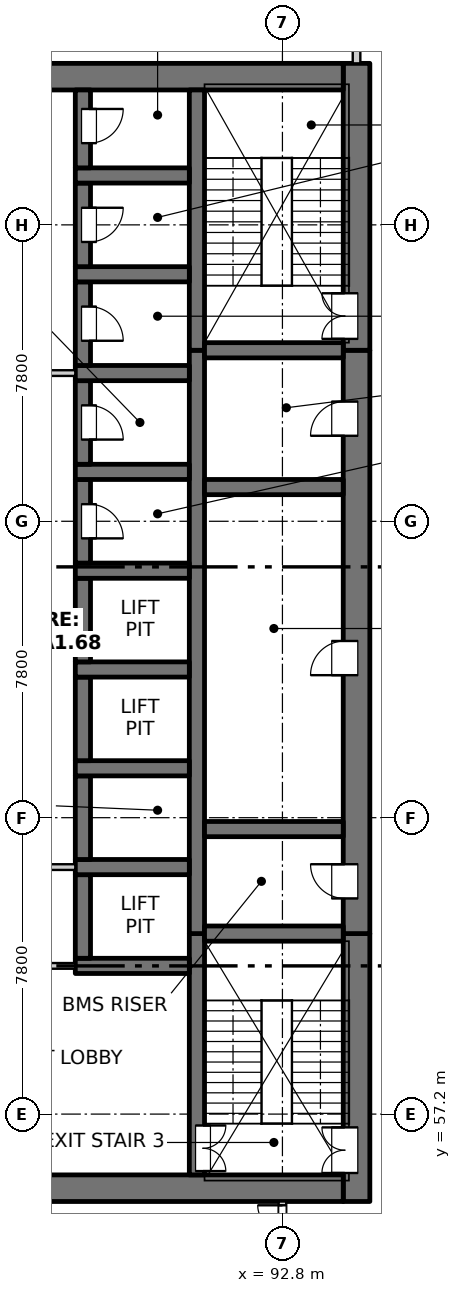
"""IFC4 building model, lengths in metres.
Left out: names, types, materials, properties, quantities, classifications, styles, units other than length and angle.
Written with IfcOpenShell. Run it as: python <this file> out.ifc"""

import sys

from ifc_helpers import new_model, si_unit, direction, frame, frame_2d, origin, place, context, subcontext, project, spatial, rectangle, extrude, element, fill, save


model = new_model("IFC4")
c1 = context("Model", 3, precision=1e-05, world=origin(), true_north=direction((0.0, 1.0)))
c2 = subcontext(c1, "Body", "Model", "MODEL_VIEW")
j1 = project(units=[si_unit("LENGTHUNIT", "METRE"), si_unit("PLANEANGLEUNIT", "RADIAN")], contexts=[c1])
p1 = place(None, origin())
s1 = spatial("IfcSite", under=j1, at=p1, CompositionType="ELEMENT")
p2 = place(p1, origin())
s2 = spatial("IfcBuilding", under=s1, at=p2, CompositionType="ELEMENT")
p3 = place(p2, frame((0.0, 0.0, -4.5)))
s3 = spatial("IfcBuildingStorey", under=s2, at=p3, CompositionType="ELEMENT", Elevation=-4.5)
p4 = place(p3, frame((94.75, 54.9, -0.35), z_axis=(0.0, 0.0, 1.0), x_axis=(0.0, 1.0, 0.0)))
e1 = element("IfcWall", 1, at=p4, inside=s3, PredefinedType="SOLIDWALL", context=c2, shape_type="SweptSolid", body=[
    extrude(rectangle(XDim=7.05, YDim=0.7, at=frame_2d((3.525, 0.0))), origin(), (0.0, 0.0, 1.0), 4.45),
])
p5 = place(p4, frame((0.75, 0.0, 0.35)))
e2 = element("IfcOpeningElement", 2, at=p5, cuts=e1, PredefinedType="OPENING", context=c2, shape_type="SweptSolid", body=[
    extrude(rectangle(XDim=1.2, YDim=2.1, at=frame_2d((0.6, 1.05))), frame((0.0, 0.36, 0.0), z_axis=(0.0, -1.0, 0.0), x_axis=(1.0, 0.0, 0.0)), (0.0, 0.0, 1.0), 0.72),
])
p6 = place(p3, frame((94.75, 61.95, -0.35), z_axis=(0.0, 0.0, 1.0), x_axis=(0.0, 1.0, 0.0)))
e3 = element("IfcWall", 3, at=p6, inside=s3, PredefinedType="SOLIDWALL", context=c2, shape_type="SweptSolid", body=[
    extrude(rectangle(XDim=15.35, YDim=0.7, at=frame_2d((7.675, 0.0))), origin(), (0.0, 0.0, 1.0), 4.45),
])
p7 = place(p6, frame((0.925, 0.0, 0.35)))
e4 = element("IfcOpeningElement", 4, at=p7, cuts=e3, PredefinedType="OPENING", context=c2, shape_type="SweptSolid", body=[
    extrude(rectangle(XDim=0.9, YDim=2.1, at=frame_2d((0.45, 1.05))), frame((0.0, 0.36, 0.0), z_axis=(0.0, -1.0, 0.0), x_axis=(1.0, 0.0, 0.0)), (0.0, 0.0, 1.0), 0.72),
])
p8 = place(p6, frame((6.8, 0.0, 0.35)))
e5 = element("IfcOpeningElement", 5, at=p8, cuts=e3, PredefinedType="OPENING", context=c2, shape_type="SweptSolid", body=[
    extrude(rectangle(XDim=0.9, YDim=2.1, at=frame_2d((0.45, 1.05))), frame((0.0, 0.36, 0.0), z_axis=(0.0, -1.0, 0.0), x_axis=(1.0, 0.0, 0.0)), (0.0, 0.0, 1.0), 0.72),
])
p9 = place(p6, frame((13.1, 0.0, 0.35)))
e6 = element("IfcOpeningElement", 6, at=p9, cuts=e3, PredefinedType="OPENING", context=c2, shape_type="SweptSolid", body=[
    extrude(rectangle(XDim=0.9, YDim=2.1, at=frame_2d((0.45, 1.05))), frame((0.0, 0.36, 0.0), z_axis=(0.0, -1.0, 0.0), x_axis=(1.0, 0.0, 0.0)), (0.0, 0.0, 1.0), 0.72),
])
p10 = place(p3, frame((94.75, 77.3, -0.35), z_axis=(0.0, 0.0, 1.0), x_axis=(0.0, 1.0, 0.0)))
e7 = element("IfcWall", 7, at=p10, inside=s3, PredefinedType="SOLIDWALL", context=c2, shape_type="SweptSolid", body=[
    extrude(rectangle(XDim=7.55, YDim=0.7, at=frame_2d((3.775, 0.0))), origin(), (0.0, 0.0, 1.0), 4.45),
])
p11 = place(p10, frame((0.3, 0.0, 0.35)))
e8 = element("IfcOpeningElement", 8, at=p11, cuts=e7, PredefinedType="OPENING", context=c2, shape_type="SweptSolid", body=[
    extrude(rectangle(XDim=1.2, YDim=2.1, at=frame_2d((0.6, 1.05))), frame((0.0, 0.36, 0.0), z_axis=(0.0, -1.0, 0.0), x_axis=(1.0, 0.0, 0.0)), (0.0, 0.0, 1.0), 0.72),
])
p12 = place(p3, frame((75.6, 55.25, -0.35), z_axis=(0.0, 0.0, 1.0), x_axis=(1.0, 0.0, 0.0)))
e9 = element("IfcWall", 9, at=p12, inside=s3, PredefinedType="SOLIDWALL", context=c2, shape_type="SweptSolid", body=[
    extrude(rectangle(XDim=18.8, YDim=0.7, at=frame_2d((9.4, 0.0))), origin(), (0.0, 0.0, 1.0), 4.45),
])
p13 = place(p12, frame((8.65, 0.0, 0.35)))
e10 = element("IfcOpeningElement", 10, at=p13, cuts=e9, PredefinedType="OPENING", context=c2, shape_type="SweptSolid", body=[
    extrude(rectangle(XDim=1.5, YDim=2.1, at=frame_2d((0.75, 1.05))), frame((0.0, 0.36, 0.0), z_axis=(0.0, -1.0, 0.0), x_axis=(1.0, 0.0, 0.0)), (0.0, 0.0, 1.0), 0.72),
])
p14 = place(p3, frame((75.6, 84.5, -0.35), z_axis=(0.0, 0.0, 1.0), x_axis=(1.0, 0.0, 0.0)))
e11 = element("IfcWall", 11, at=p14, inside=s3, PredefinedType="SOLIDWALL", context=c2, shape_type="SweptSolid", body=[
    extrude(rectangle(XDim=18.8, YDim=0.7, at=frame_2d((9.4, 0.0))), origin(), (0.0, 0.0, 1.0), 4.45),
])
p15 = place(p3, frame((90.55, 55.6, -0.35), z_axis=(0.0, 0.0, 1.0), x_axis=(0.0, 1.0, 0.0)))
e12 = element("IfcWall", 12, at=p15, inside=s3, PredefinedType="SOLIDWALL", context=c2, shape_type="SweptSolid", body=[
    extrude(rectangle(XDim=6.35, YDim=0.4, at=frame_2d((3.175, 0.0))), origin(), (0.0, 0.0, 1.0), 4.45),
])
p16 = place(p15, frame((0.1, 0.0, 0.35)))
e13 = element("IfcOpeningElement", 13, at=p16, cuts=e12, PredefinedType="OPENING", context=c2, shape_type="SweptSolid", body=[
    extrude(rectangle(XDim=1.2, YDim=2.1, at=frame_2d((0.6, 1.05))), frame((0.0, 0.21, 0.0), z_axis=(0.0, -1.0, 0.0), x_axis=(1.0, 0.0, 0.0)), (0.0, 0.0, 1.0), 0.42),
])
p17 = place(p3, frame((90.55, 61.95, -0.35), z_axis=(0.0, 0.0, 1.0), x_axis=(0.0, 1.0, 0.0)))
e14 = element("IfcWall", 14, at=p17, inside=s3, PredefinedType="SOLIDWALL", context=c2, shape_type="SweptSolid", body=[
    extrude(rectangle(XDim=15.35, YDim=0.4, at=frame_2d((7.675, 0.0))), origin(), (0.0, 0.0, 1.0), 4.45),
])
p18 = place(p3, frame((90.55, 77.3, -0.35), z_axis=(0.0, 0.0, 1.0), x_axis=(0.0, 1.0, 0.0)))
e15 = element("IfcWall", 15, at=p18, inside=s3, PredefinedType="SOLIDWALL", context=c2, shape_type="SweptSolid", body=[
    extrude(rectangle(XDim=6.85, YDim=0.4, at=frame_2d((3.425, 0.0))), origin(), (0.0, 0.0, 1.0), 4.45),
])
p19 = place(p3, frame((87.35, 61.1, -0.35), z_axis=(0.0, 0.0, 1.0), x_axis=(1.0, 0.0, 0.0)))
e16 = element("IfcWall", 16, at=p19, inside=s3, PredefinedType="SOLIDWALL", context=c2, shape_type="SweptSolid", body=[
    extrude(rectangle(XDim=3.0, YDim=0.4, at=frame_2d((1.5, 0.0))), origin(), (0.0, 0.0, 1.0), 4.45),
])
p20 = place(p3, frame((87.55, 61.3, -0.35), z_axis=(0.0, 0.0, 1.0), x_axis=(0.0, 1.0, 0.0)))
e17 = element("IfcWall", 17, at=p20, inside=s3, PredefinedType="SOLIDWALL", context=c2, shape_type="SweptSolid", body=[
    extrude(rectangle(XDim=2.2, YDim=0.4, at=frame_2d((1.1, 0.0))), origin(), (0.0, 0.0, 1.0), 4.45),
])
p21 = place(p3, frame((87.35, 63.7, -0.35), z_axis=(0.0, 0.0, 1.0), x_axis=(1.0, 0.0, 0.0)))
e18 = element("IfcWall", 18, at=p21, inside=s3, PredefinedType="SOLIDWALL", context=c2, shape_type="SweptSolid", body=[
    extrude(rectangle(XDim=3.0, YDim=0.4, at=frame_2d((1.5, 0.0))), origin(), (0.0, 0.0, 1.0), 4.45),
])
p22 = place(p3, frame((87.55, 63.9, -0.35), z_axis=(0.0, 0.0, 1.0), x_axis=(0.0, 1.0, 0.0)))
e19 = element("IfcWall", 19, at=p22, inside=s3, PredefinedType="SOLIDWALL", context=c2, shape_type="SweptSolid", body=[
    extrude(rectangle(XDim=2.2, YDim=0.4, at=frame_2d((1.1, 0.0))), origin(), (0.0, 0.0, 1.0), 4.45),
])
p23 = place(p3, frame((87.35, 66.3, -0.35), z_axis=(0.0, 0.0, 1.0), x_axis=(1.0, 0.0, 0.0)))
e20 = element("IfcWall", 20, at=p23, inside=s3, PredefinedType="SOLIDWALL", context=c2, shape_type="SweptSolid", body=[
    extrude(rectangle(XDim=3.0, YDim=0.4, at=frame_2d((1.5, 0.0))), origin(), (0.0, 0.0, 1.0), 4.45),
])
p24 = place(p3, frame((87.55, 66.5, -0.35), z_axis=(0.0, 0.0, 1.0), x_axis=(0.0, 1.0, 0.0)))
e21 = element("IfcWall", 21, at=p24, inside=s3, PredefinedType="SOLIDWALL", context=c2, shape_type="SweptSolid", body=[
    extrude(rectangle(XDim=2.2, YDim=0.4, at=frame_2d((1.1, 0.0))), origin(), (0.0, 0.0, 1.0), 4.45),
])
p25 = place(p3, frame((87.35, 68.9, -0.35), z_axis=(0.0, 0.0, 1.0), x_axis=(1.0, 0.0, 0.0)))
e22 = element("IfcWall", 22, at=p25, inside=s3, PredefinedType="SOLIDWALL", context=c2, shape_type="SweptSolid", body=[
    extrude(rectangle(XDim=3.0, YDim=0.4, at=frame_2d((1.5, 0.0))), origin(), (0.0, 0.0, 1.0), 4.45),
])
p26 = place(p3, frame((87.55, 69.1, -0.35), z_axis=(0.0, 0.0, 1.0), x_axis=(0.0, 1.0, 0.0)))
e23 = element("IfcWall", 23, at=p26, inside=s3, PredefinedType="SOLIDWALL", context=c2, shape_type="SweptSolid", body=[
    extrude(rectangle(XDim=2.2, YDim=0.4, at=frame_2d((1.1, 0.0))), origin(), (0.0, 0.0, 1.0), 4.45),
])
p27 = place(p3, frame((87.35, 71.5, -0.35), z_axis=(0.0, 0.0, 1.0), x_axis=(1.0, 0.0, 0.0)))
e24 = element("IfcWall", 24, at=p27, inside=s3, PredefinedType="SOLIDWALL", context=c2, shape_type="SweptSolid", body=[
    extrude(rectangle(XDim=3.0, YDim=0.4, at=frame_2d((1.5, 0.0))), origin(), (0.0, 0.0, 1.0), 4.45),
])
p28 = place(p3, frame((87.55, 71.7, -0.35), z_axis=(0.0, 0.0, 1.0), x_axis=(0.0, 1.0, 0.0)))
e25 = element("IfcWall", 25, at=p28, inside=s3, PredefinedType="SOLIDWALL", context=c2, shape_type="SweptSolid", body=[
    extrude(rectangle(XDim=2.2, YDim=0.4, at=frame_2d((1.1, 0.0))), origin(), (0.0, 0.0, 1.0), 4.45),
])
p29 = place(p28, frame((0.65, 0.0, 0.35)))
e26 = element("IfcOpeningElement", 26, at=p29, cuts=e25, PredefinedType="OPENING", context=c2, shape_type="SweptSolid", body=[
    extrude(rectangle(XDim=0.9, YDim=2.1, at=frame_2d((0.45, 1.05))), frame((0.0, 0.21, 0.0), z_axis=(0.0, -1.0, 0.0), x_axis=(1.0, 0.0, 0.0)), (0.0, 0.0, 1.0), 0.42),
])
p30 = place(p3, frame((87.35, 74.1, -0.35), z_axis=(0.0, 0.0, 1.0), x_axis=(1.0, 0.0, 0.0)))
e27 = element("IfcWall", 27, at=p30, inside=s3, PredefinedType="SOLIDWALL", context=c2, shape_type="SweptSolid", body=[
    extrude(rectangle(XDim=3.0, YDim=0.4, at=frame_2d((1.5, 0.0))), origin(), (0.0, 0.0, 1.0), 4.45),
])
p31 = place(p3, frame((87.55, 74.3, -0.35), z_axis=(0.0, 0.0, 1.0), x_axis=(0.0, 1.0, 0.0)))
e28 = element("IfcWall", 28, at=p31, inside=s3, PredefinedType="SOLIDWALL", context=c2, shape_type="SweptSolid", body=[
    extrude(rectangle(XDim=2.2, YDim=0.4, at=frame_2d((1.1, 0.0))), origin(), (0.0, 0.0, 1.0), 4.45),
])
p32 = place(p31, frame((0.65, 0.0, 0.35)))
e29 = element("IfcOpeningElement", 29, at=p32, cuts=e28, PredefinedType="OPENING", context=c2, shape_type="SweptSolid", body=[
    extrude(rectangle(XDim=0.9, YDim=2.1, at=frame_2d((0.45, 1.05))), frame((0.0, 0.21, 0.0), z_axis=(0.0, -1.0, 0.0), x_axis=(1.0, 0.0, 0.0)), (0.0, 0.0, 1.0), 0.42),
])
p33 = place(p3, frame((87.35, 76.7, -0.35), z_axis=(0.0, 0.0, 1.0), x_axis=(1.0, 0.0, 0.0)))
e30 = element("IfcWall", 30, at=p33, inside=s3, PredefinedType="SOLIDWALL", context=c2, shape_type="SweptSolid", body=[
    extrude(rectangle(XDim=3.0, YDim=0.4, at=frame_2d((1.5, 0.0))), origin(), (0.0, 0.0, 1.0), 4.45),
])
p34 = place(p3, frame((87.55, 76.9, -0.35), z_axis=(0.0, 0.0, 1.0), x_axis=(0.0, 1.0, 0.0)))
e31 = element("IfcWall", 31, at=p34, inside=s3, PredefinedType="SOLIDWALL", context=c2, shape_type="SweptSolid", body=[
    extrude(rectangle(XDim=2.2, YDim=0.4, at=frame_2d((1.1, 0.0))), origin(), (0.0, 0.0, 1.0), 4.45),
])
p35 = place(p34, frame((0.65, 0.0, 0.35)))
e32 = element("IfcOpeningElement", 32, at=p35, cuts=e31, PredefinedType="OPENING", context=c2, shape_type="SweptSolid", body=[
    extrude(rectangle(XDim=0.9, YDim=2.1, at=frame_2d((0.45, 1.05))), frame((0.0, 0.21, 0.0), z_axis=(0.0, -1.0, 0.0), x_axis=(1.0, 0.0, 0.0)), (0.0, 0.0, 1.0), 0.42),
])
p36 = place(p3, frame((87.35, 79.3, -0.35), z_axis=(0.0, 0.0, 1.0), x_axis=(1.0, 0.0, 0.0)))
e33 = element("IfcWall", 33, at=p36, inside=s3, PredefinedType="SOLIDWALL", context=c2, shape_type="SweptSolid", body=[
    extrude(rectangle(XDim=3.0, YDim=0.4, at=frame_2d((1.5, 0.0))), origin(), (0.0, 0.0, 1.0), 4.45),
])
p37 = place(p3, frame((87.55, 79.5, -0.35), z_axis=(0.0, 0.0, 1.0), x_axis=(0.0, 1.0, 0.0)))
e34 = element("IfcWall", 34, at=p37, inside=s3, PredefinedType="SOLIDWALL", context=c2, shape_type="SweptSolid", body=[
    extrude(rectangle(XDim=2.2, YDim=0.4, at=frame_2d((1.1, 0.0))), origin(), (0.0, 0.0, 1.0), 4.45),
])
p38 = place(p37, frame((0.65, 0.0, 0.35)))
e35 = element("IfcOpeningElement", 35, at=p38, cuts=e34, PredefinedType="OPENING", context=c2, shape_type="SweptSolid", body=[
    extrude(rectangle(XDim=0.9, YDim=2.1, at=frame_2d((0.45, 1.05))), frame((0.0, 0.21, 0.0), z_axis=(0.0, -1.0, 0.0), x_axis=(1.0, 0.0, 0.0)), (0.0, 0.0, 1.0), 0.42),
])
p39 = place(p3, frame((87.35, 81.9, -0.35), z_axis=(0.0, 0.0, 1.0), x_axis=(1.0, 0.0, 0.0)))
e36 = element("IfcWall", 36, at=p39, inside=s3, PredefinedType="SOLIDWALL", context=c2, shape_type="SweptSolid", body=[
    extrude(rectangle(XDim=3.0, YDim=0.4, at=frame_2d((1.5, 0.0))), origin(), (0.0, 0.0, 1.0), 4.45),
])
p40 = place(p3, frame((87.55, 82.1, -0.35), z_axis=(0.0, 0.0, 1.0), x_axis=(0.0, 1.0, 0.0)))
e37 = element("IfcWall", 37, at=p40, inside=s3, PredefinedType="SOLIDWALL", context=c2, shape_type="SweptSolid", body=[
    extrude(rectangle(XDim=2.05, YDim=0.4, at=frame_2d((1.025, 0.0))), origin(), (0.0, 0.0, 1.0), 4.45),
])
p41 = place(p40, frame((0.65, 0.0, 0.35)))
e38 = element("IfcOpeningElement", 38, at=p41, cuts=e37, PredefinedType="OPENING", context=c2, shape_type="SweptSolid", body=[
    extrude(rectangle(XDim=0.9, YDim=2.1, at=frame_2d((0.45, 1.05))), frame((0.0, 0.21, 0.0), z_axis=(0.0, -1.0, 0.0), x_axis=(1.0, 0.0, 0.0)), (0.0, 0.0, 1.0), 0.42),
])
for number, where, z_axis, x_axis in (
    (39, (90.75, 61.95, -0.35), (0.0, 0.0, 1.0), (1.0, 0.0, 0.0)),
    (40, (90.75, 64.7, -0.35), (0.0, 0.0, 1.0), (1.0, 0.0, 0.0)),
    (41, (90.75, 73.7, -0.35), (0.0, 0.0, 1.0), (1.0, 0.0, 0.0)),
    (42, (90.75, 77.3, -0.35), (0.0, 0.0, 1.0), (1.0, 0.0, 0.0)),
):
    element("IfcWall", number, at=place(p3, frame(where, z_axis=z_axis, x_axis=x_axis)), inside=s3, PredefinedType="SOLIDWALL", context=c2, shape_type="SweptSolid", body=[
        extrude(rectangle(XDim=3.65, YDim=0.4, at=frame_2d((1.825, 0.0))), origin(), (0.0, 0.0, 1.0), 4.45),
    ])
p42 = place(p3, frame((82.65, 61.1, 0.0), z_axis=(0.0, 0.0, 1.0), x_axis=(1.0, 0.0, 0.0)))
e43 = element("IfcWall", 43, at=p42, inside=s3, PredefinedType="PARTITIONING", context=c2, shape_type="SweptSolid", body=[
    extrude(rectangle(XDim=4.7, YDim=0.15, at=frame_2d((2.35, 0.0))), origin(), (0.0, 0.0, 1.0), 4.1),
])
p43 = place(p42, frame((1.45, 0.0, 0.0)))
e44 = element("IfcOpeningElement", 44, at=p43, cuts=e43, PredefinedType="OPENING", context=c2, shape_type="SweptSolid", body=[
    extrude(rectangle(XDim=1.8, YDim=2.1, at=frame_2d((0.9, 1.05))), frame((0.0, 0.085, 0.0), z_axis=(0.0, -1.0, 0.0), x_axis=(1.0, 0.0, 0.0)), (0.0, 0.0, 1.0), 0.17),
])
p44 = place(p3, frame((82.65, 63.7, 0.0), z_axis=(0.0, 0.0, 1.0), x_axis=(1.0, 0.0, 0.0)))
e45 = element("IfcWall", 45, at=p44, inside=s3, PredefinedType="PARTITIONING", context=c2, shape_type="SweptSolid", body=[
    extrude(rectangle(XDim=4.7, YDim=0.15, at=frame_2d((2.35, 0.0))), origin(), (0.0, 0.0, 1.0), 4.1),
])
p45 = place(p44, frame((1.45, 0.0, 0.0)))
e46 = element("IfcOpeningElement", 46, at=p45, cuts=e45, PredefinedType="OPENING", context=c2, shape_type="SweptSolid", body=[
    extrude(rectangle(XDim=1.8, YDim=2.1, at=frame_2d((0.9, 1.05))), frame((0.0, 0.085, 0.0), z_axis=(0.0, -1.0, 0.0), x_axis=(1.0, 0.0, 0.0)), (0.0, 0.0, 1.0), 0.17),
])
p46 = place(p3, frame((82.65, 76.7, 0.0), z_axis=(0.0, 0.0, 1.0), x_axis=(1.0, 0.0, 0.0)))
e47 = element("IfcWall", 47, at=p46, inside=s3, PredefinedType="PARTITIONING", context=c2, shape_type="SweptSolid", body=[
    extrude(rectangle(XDim=4.7, YDim=0.15, at=frame_2d((2.35, 0.0))), origin(), (0.0, 0.0, 1.0), 4.1),
])
p47 = place(p46, frame((1.45, 0.0, 0.0)))
e48 = element("IfcOpeningElement", 48, at=p47, cuts=e47, PredefinedType="OPENING", context=c2, shape_type="SweptSolid", body=[
    extrude(rectangle(XDim=1.8, YDim=2.1, at=frame_2d((0.9, 1.05))), frame((0.0, 0.085, 0.0), z_axis=(0.0, -1.0, 0.0), x_axis=(1.0, 0.0, 0.0)), (0.0, 0.0, 1.0), 0.17),
])
p48 = place(p3, frame((92.8, 53.4, 0.0), z_axis=(0.0, 0.0, 1.0), x_axis=(0.0, 1.0, 0.0)))
e49 = element("IfcWall", 49, at=p48, inside=s3, PredefinedType="PARTITIONING", context=c2, shape_type="SweptSolid", body=[
    extrude(rectangle(XDim=1.5, YDim=0.2, at=frame_2d((0.75, 0.0))), origin(), (0.0, 0.0, 1.0), 4.1),
])
p49 = place(p48, frame((0.1, 0.0, 0.0)))
e50 = element("IfcOpeningElement", 50, at=p49, cuts=e49, PredefinedType="OPENING", context=c2, shape_type="SweptSolid", body=[
    extrude(rectangle(XDim=1.3, YDim=2.1, at=frame_2d((0.65, 1.05))), frame((0.0, 0.11, 0.0), z_axis=(0.0, -1.0, 0.0), x_axis=(1.0, 0.0, 0.0)), (0.0, 0.0, 1.0), 0.22),
])
p50 = place(p3, frame((94.75, 84.85, 0.0), z_axis=(0.0, 0.0, 1.0), x_axis=(0.0, 1.0, 0.0)))
e51 = element("IfcWall", 51, at=p50, inside=s3, PredefinedType="PARTITIONING", context=c2, shape_type="SweptSolid", body=[
    extrude(rectangle(XDim=7.15, YDim=0.2, at=frame_2d((3.575, 0.0))), origin(), (0.0, 0.0, 1.0), 4.1),
])
p51 = place(p50, frame((1.0, 0.0, 0.0)))
e52 = element("IfcOpeningElement", 52, at=p51, cuts=e51, PredefinedType="OPENING", context=c2, shape_type="SweptSolid", body=[
    extrude(rectangle(XDim=1.2, YDim=2.1, at=frame_2d((0.6, 1.05))), frame((0.0, 0.11, 0.0), z_axis=(0.0, -1.0, 0.0), x_axis=(1.0, 0.0, 0.0)), (0.0, 0.0, 1.0), 0.22),
])
p52 = place(p49, origin())
e53 = element("IfcDoor", 53, at=p52, inside=s3, OperationType="DOUBLE_DOOR_SINGLE_SWING", PredefinedType="DOOR", context=c2, shape_type="SweptSolid", body=[
    extrude(rectangle(XDim=1.3, YDim=2.1, at=frame_2d((0.65, 1.05))), frame((0.0, 0.025, 0.0), z_axis=(0.0, -1.0, 0.0), x_axis=(1.0, 0.0, 0.0)), (0.0, 0.0, 1.0), 0.05),
])
fill(e50, e53)
p53 = place(p16, origin())
e54 = element("IfcDoor", 54, at=p53, inside=s3, OperationType="DOUBLE_DOOR_SINGLE_SWING", PredefinedType="DOOR", context=c2, shape_type="SweptSolid", body=[
    extrude(rectangle(XDim=1.2, YDim=2.1, at=frame_2d((0.6, 1.05))), frame((0.0, -0.135, 0.0), z_axis=(0.0, -1.0, 0.0), x_axis=(1.0, 0.0, 0.0)), (0.0, 0.0, 1.0), 0.05),
])
fill(e13, e54)
p54 = place(p5, origin())
e55 = element("IfcDoor", 55, at=p54, inside=s3, OperationType="DOUBLE_DOOR_SINGLE_SWING", PredefinedType="DOOR", context=c2, shape_type="SweptSolid", body=[
    extrude(rectangle(XDim=1.2, YDim=2.1, at=frame_2d((0.6, 1.05))), frame((0.0, 0.335, 0.0), z_axis=(0.0, -1.0, 0.0), x_axis=(1.0, 0.0, 0.0)), (0.0, 0.0, 1.0), 0.05),
])
fill(e2, e55)
p55 = place(p7, origin())
e56 = element("IfcDoor", 56, at=p55, inside=s3, OperationType="SINGLE_SWING_RIGHT", PredefinedType="DOOR", context=c2, shape_type="SweptSolid", body=[
    extrude(rectangle(XDim=0.9, YDim=2.1, at=frame_2d((0.45, 1.05))), frame((0.0, 0.335, 0.0), z_axis=(0.0, -1.0, 0.0), x_axis=(1.0, 0.0, 0.0)), (0.0, 0.0, 1.0), 0.05),
])
fill(e4, e56)
p56 = place(p8, origin())
e57 = element("IfcDoor", 57, at=p56, inside=s3, OperationType="SINGLE_SWING_LEFT", PredefinedType="DOOR", context=c2, shape_type="SweptSolid", body=[
    extrude(rectangle(XDim=0.9, YDim=2.1, at=frame_2d((0.45, 1.05))), frame((0.0, 0.335, 0.0), z_axis=(0.0, -1.0, 0.0), x_axis=(1.0, 0.0, 0.0)), (0.0, 0.0, 1.0), 0.05),
])
fill(e5, e57)
p57 = place(p29, origin())
e58 = element("IfcDoor", 58, at=p57, inside=s3, OperationType="SINGLE_SWING_RIGHT", PredefinedType="DOOR", context=c2, shape_type="SweptSolid", body=[
    extrude(rectangle(XDim=0.9, YDim=2.1, at=frame_2d((0.45, 1.05))), frame((0.0, -0.135, 0.0), z_axis=(0.0, -1.0, 0.0), x_axis=(1.0, 0.0, 0.0)), (0.0, 0.0, 1.0), 0.05),
])
fill(e26, e58)
p58 = place(p32, origin())
e59 = element("IfcDoor", 59, at=p58, inside=s3, OperationType="SINGLE_SWING_RIGHT", PredefinedType="DOOR", context=c2, shape_type="SweptSolid", body=[
    extrude(rectangle(XDim=0.9, YDim=2.1, at=frame_2d((0.45, 1.05))), frame((0.0, -0.135, 0.0), z_axis=(0.0, -1.0, 0.0), x_axis=(1.0, 0.0, 0.0)), (0.0, 0.0, 1.0), 0.05),
])
fill(e29, e59)
p59 = place(p9, origin())
e60 = element("IfcDoor", 60, at=p59, inside=s3, OperationType="SINGLE_SWING_LEFT", PredefinedType="DOOR", context=c2, shape_type="SweptSolid", body=[
    extrude(rectangle(XDim=0.9, YDim=2.1, at=frame_2d((0.45, 1.05))), frame((0.0, 0.335, 0.0), z_axis=(0.0, -1.0, 0.0), x_axis=(1.0, 0.0, 0.0)), (0.0, 0.0, 1.0), 0.05),
])
fill(e6, e60)
p60 = place(p35, origin())
e61 = element("IfcDoor", 61, at=p60, inside=s3, OperationType="SINGLE_SWING_RIGHT", PredefinedType="DOOR", context=c2, shape_type="SweptSolid", body=[
    extrude(rectangle(XDim=0.9, YDim=2.1, at=frame_2d((0.45, 1.05))), frame((0.0, -0.135, 0.0), z_axis=(0.0, -1.0, 0.0), x_axis=(1.0, 0.0, 0.0)), (0.0, 0.0, 1.0), 0.05),
])
fill(e32, e61)
p61 = place(p11, origin())
e62 = element("IfcDoor", 62, at=p61, inside=s3, OperationType="DOUBLE_DOOR_SINGLE_SWING", PredefinedType="DOOR", context=c2, shape_type="SweptSolid", body=[
    extrude(rectangle(XDim=1.2, YDim=2.1, at=frame_2d((0.6, 1.05))), frame((0.0, 0.335, 0.0), z_axis=(0.0, -1.0, 0.0), x_axis=(1.0, 0.0, 0.0)), (0.0, 0.0, 1.0), 0.05),
])
fill(e8, e62)
p62 = place(p38, origin())
e63 = element("IfcDoor", 63, at=p62, inside=s3, OperationType="SINGLE_SWING_LEFT", PredefinedType="DOOR", context=c2, shape_type="SweptSolid", body=[
    extrude(rectangle(XDim=0.9, YDim=2.1, at=frame_2d((0.45, 1.05))), frame((0.0, -0.135, 0.0), z_axis=(0.0, -1.0, 0.0), x_axis=(1.0, 0.0, 0.0)), (0.0, 0.0, 1.0), 0.05),
])
fill(e35, e63)
p63 = place(p41, origin())
e64 = element("IfcDoor", 64, at=p63, inside=s3, OperationType="SINGLE_SWING_LEFT", PredefinedType="DOOR", context=c2, shape_type="SweptSolid", body=[
    extrude(rectangle(XDim=0.9, YDim=2.1, at=frame_2d((0.45, 1.05))), frame((0.0, -0.135, 0.0), z_axis=(0.0, -1.0, 0.0), x_axis=(1.0, 0.0, 0.0)), (0.0, 0.0, 1.0), 0.05),
])
fill(e38, e64)
save(model, sys.argv[1])
